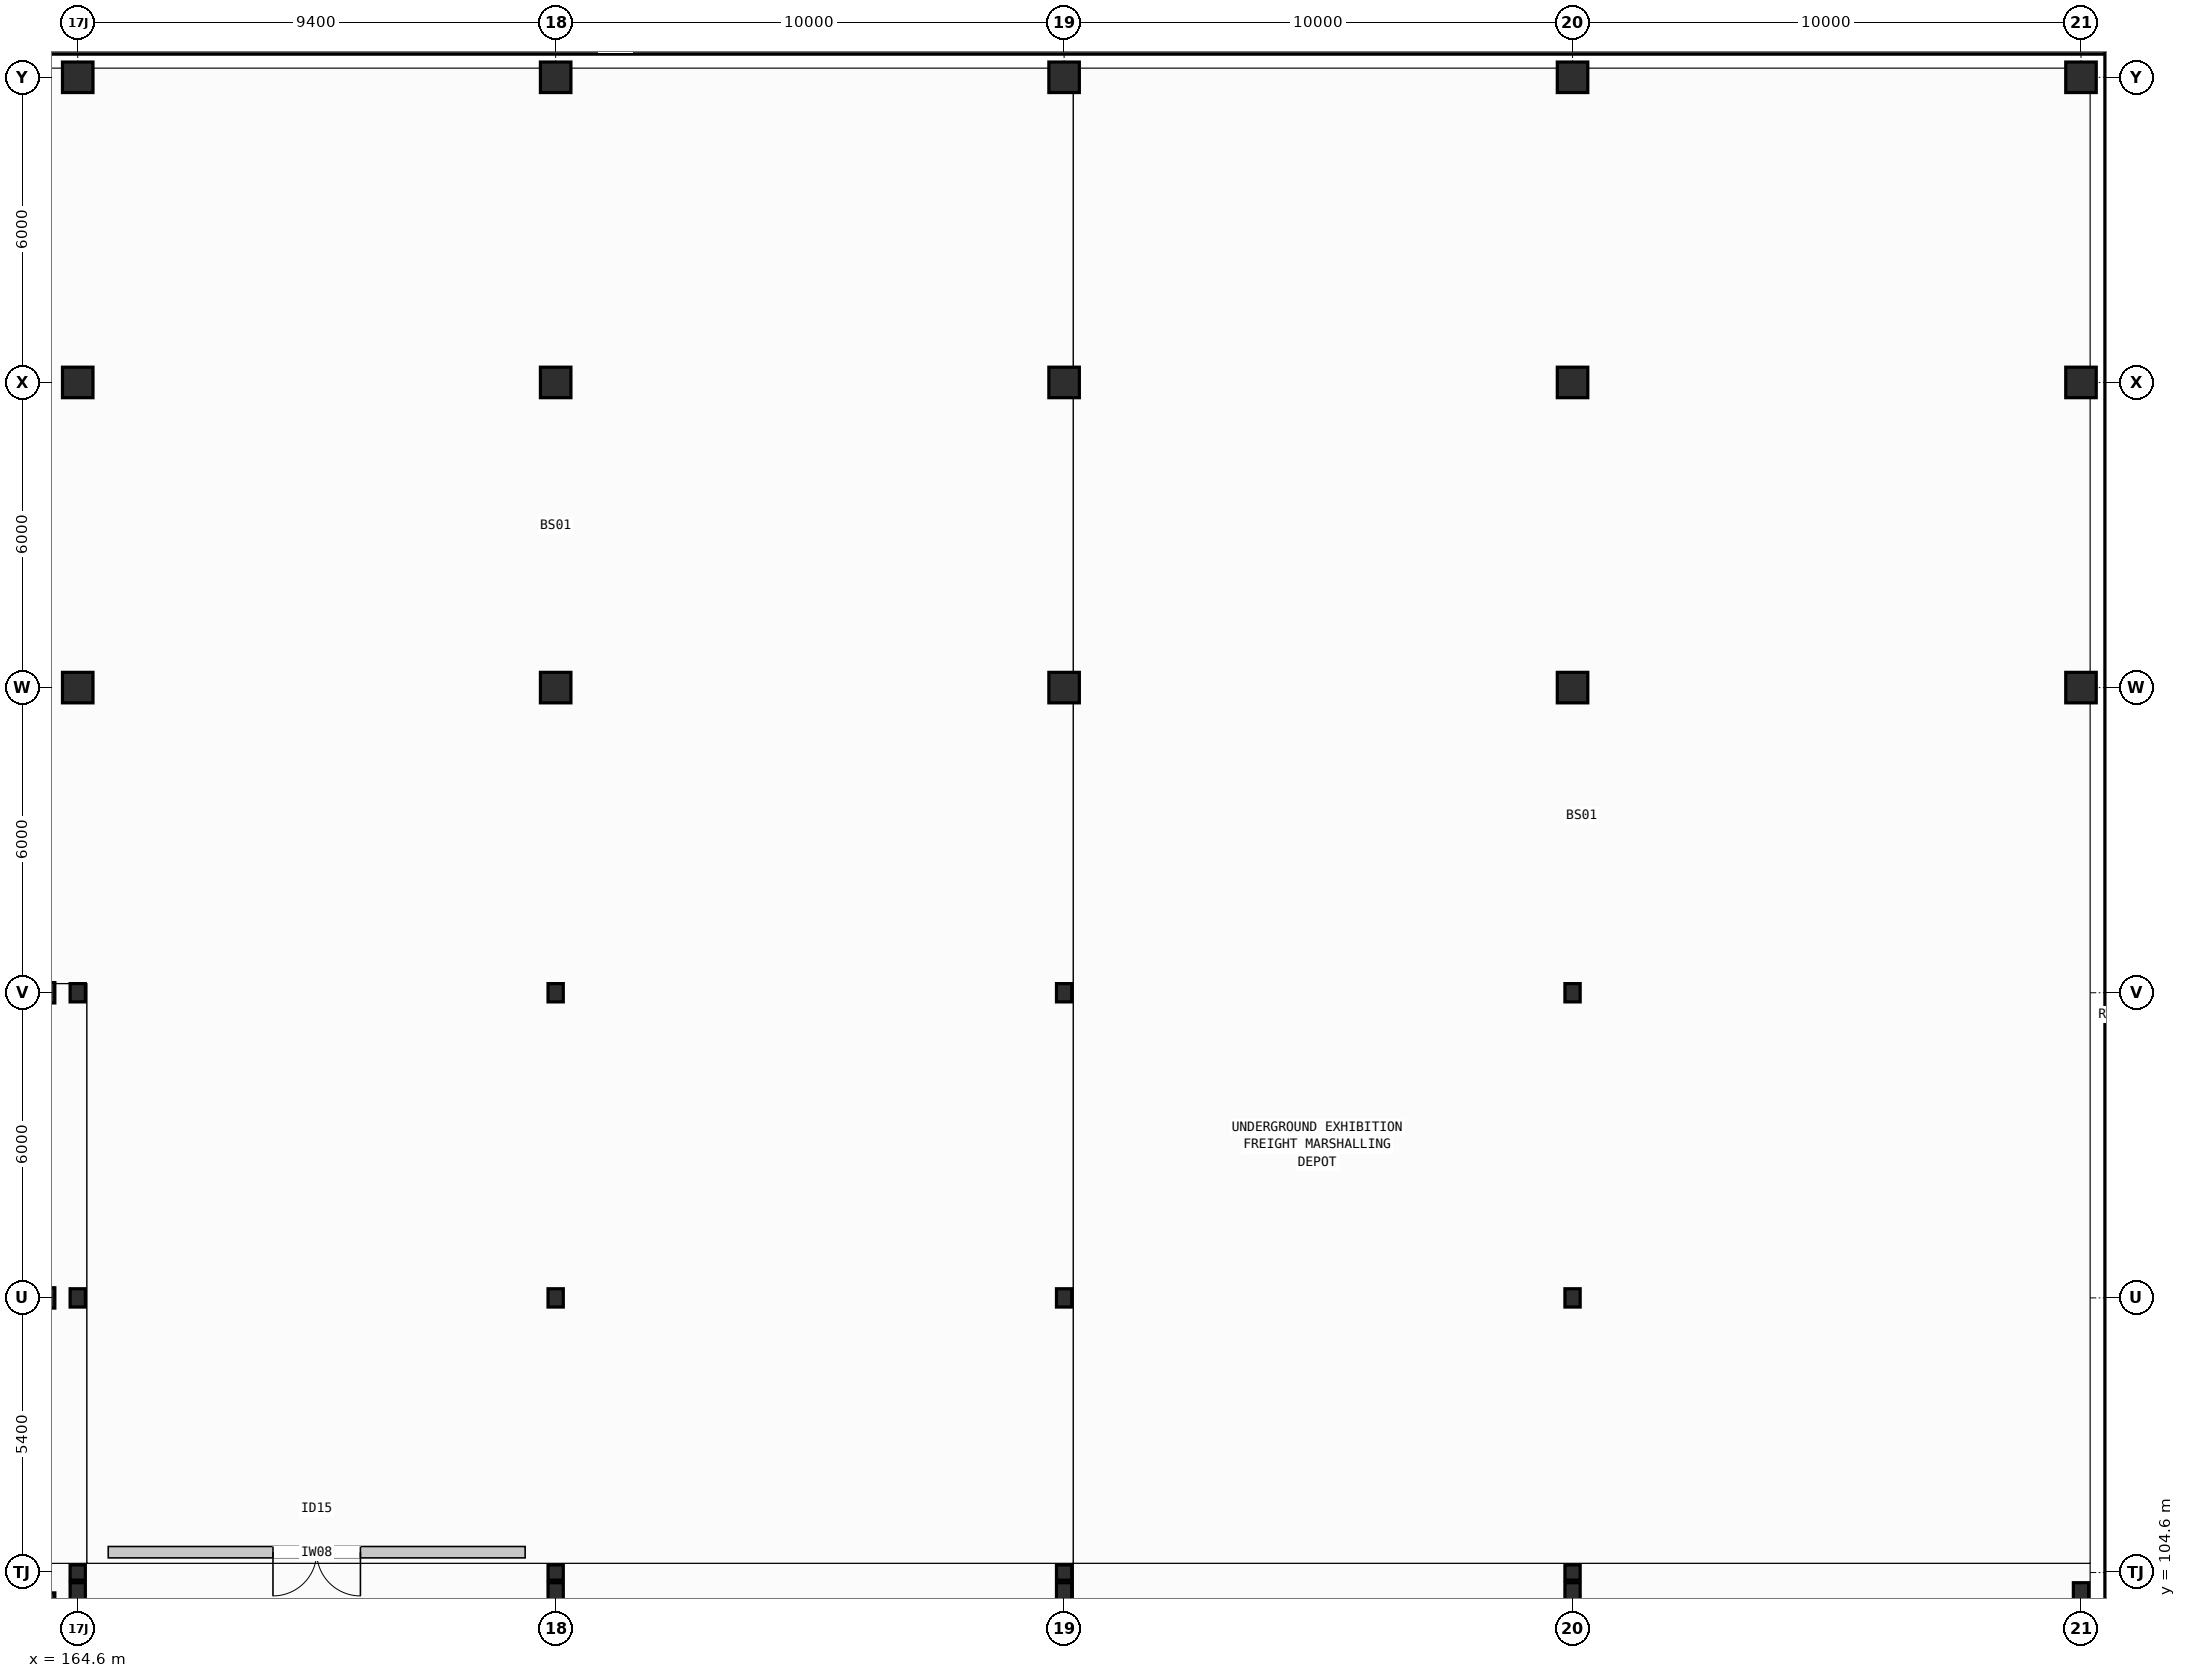
"""IFC4 building model, lengths in metres.
Left out: names, types, materials, properties, quantities, classifications, styles, units other than length and angle.
Written with IfcOpenShell. Run it as: python <this file> out.ifc"""

import sys

from ifc_helpers import new_model, si_unit, direction, frame, frame_2d, origin, origin_2d, place, context, subcontext, project, spatial, rectangle, i_section, extrude, element, fill, save


model = new_model("IFC4")
c1 = context("Model", 3, precision=1e-05, world=origin(), true_north=direction((0.0, 1.0)))
c2 = subcontext(c1, "Body", "Model", "MODEL_VIEW")
j1 = project(units=[si_unit("LENGTHUNIT", "METRE"), si_unit("PLANEANGLEUNIT", "RADIAN")], contexts=[c1])
p1 = place(None, origin())
s1 = spatial("IfcSite", under=j1, at=p1, CompositionType="ELEMENT")
p2 = place(p1, origin())
s2 = spatial("IfcBuilding", under=s1, at=p2, CompositionType="ELEMENT")
p3 = place(p2, frame((0.0, 0.0, -5.4)))
s3 = spatial("IfcBuildingStorey", under=s2, at=p3, CompositionType="ELEMENT", Elevation=-5.4)
for number, where, z_axis, x_axis in (
    (1, (164.0, 104.0, 0.0), (0.0, 0.0, 1.0), (1.0, 0.0, 0.0)),
    (2, (164.0, 110.0, 0.0), (0.0, 0.0, 1.0), (1.0, 0.0, 0.0)),
    (3, (164.0, 116.0, 0.0), (0.0, 0.0, 1.0), (1.0, 0.0, 0.0)),
):
    element("IfcColumn", number, at=place(p3, frame(where, z_axis=z_axis, x_axis=x_axis)), inside=s3, PredefinedType="COLUMN", context=c2, shape_type="SweptSolid", body=[
        extrude(i_section(OverallWidth=0.3, OverallDepth=0.4, WebThickness=0.013, FlangeThickness=0.024, FilletRadius=0.027, at=origin_2d()), origin(), (0.0, 0.0, 1.0), 5.4),
    ])
p4 = place(p3, frame((164.6, 104.0, 0.0), z_axis=(0.0, 0.0, 1.0), x_axis=(1.0, 0.0, 0.0)))
e4 = element("IfcColumn", 4, at=p4, inside=s3, PredefinedType="COLUMN", context=c2, shape_type="SweptSolid", body=[
    extrude(i_section(OverallWidth=0.3, OverallDepth=0.8, WebThickness=0.018, FlangeThickness=0.033, FilletRadius=0.03, at=origin_2d()), origin(), (0.0, 0.0, 1.0), 5.4),
])
p5 = place(p3, frame((164.6, 104.6, 0.0), z_axis=(0.0, 0.0, 1.0), x_axis=(1.0, 0.0, 0.0)))
e5 = element("IfcColumn", 5, at=p5, inside=s3, PredefinedType="COLUMN", context=c2, shape_type="SweptSolid", body=[
    extrude(i_section(OverallWidth=0.3, OverallDepth=0.3, WebThickness=0.011, FlangeThickness=0.019, FilletRadius=0.027, at=origin_2d()), origin(), (0.0, 0.0, 1.0), 5.4),
])
for number, where, z_axis, x_axis in (
    (6, (164.6, 110.0, 0.0), (0.0, 0.0, 1.0), (1.0, 0.0, 0.0)),
    (7, (164.6, 116.0, 0.0), (0.0, 0.0, 1.0), (1.0, 0.0, 0.0)),
):
    element("IfcColumn", number, at=place(p3, frame(where, z_axis=z_axis, x_axis=x_axis)), inside=s3, PredefinedType="COLUMN", context=c2, shape_type="SweptSolid", body=[
        extrude(i_section(OverallWidth=0.3, OverallDepth=0.36, WebThickness=0.012, FlangeThickness=0.022, FilletRadius=0.027, at=origin_2d()), origin(), (0.0, 0.0, 1.0), 5.4),
    ])
for number, where, z_axis, x_axis in (
    (8, (164.6, 122.0, 0.0), (0.0, 0.0, 1.0), (1.0, 0.0, 0.0)),
    (9, (164.6, 128.0, 0.0), (0.0, 0.0, 1.0), (1.0, 0.0, 0.0)),
    (10, (164.6, 134.0, 0.0), (0.0, 0.0, 1.0), (1.0, 0.0, 0.0)),
):
    element("IfcColumn", number, at=place(p3, frame(where, z_axis=z_axis, x_axis=x_axis)), inside=s3, PredefinedType="COLUMN", context=c2, shape_type="SweptSolid", body=[
        extrude(rectangle(XDim=0.6, YDim=0.6, at=origin_2d()), origin(), (0.0, 0.0, 1.0), 5.4),
    ])
p6 = place(p3, frame((174.0, 104.0, 0.0), z_axis=(0.0, 0.0, 1.0), x_axis=(1.0, 0.0, 0.0)))
e11 = element("IfcColumn", 11, at=p6, inside=s3, PredefinedType="COLUMN", context=c2, shape_type="SweptSolid", body=[
    extrude(i_section(OverallWidth=0.3, OverallDepth=0.8, WebThickness=0.018, FlangeThickness=0.033, FilletRadius=0.03, at=origin_2d()), origin(), (0.0, 0.0, 1.0), 5.4),
])
p7 = place(p3, frame((174.0, 104.6, 0.0), z_axis=(0.0, 0.0, 1.0), x_axis=(1.0, 0.0, 0.0)))
e12 = element("IfcColumn", 12, at=p7, inside=s3, PredefinedType="COLUMN", context=c2, shape_type="SweptSolid", body=[
    extrude(i_section(OverallWidth=0.3, OverallDepth=0.3, WebThickness=0.011, FlangeThickness=0.019, FilletRadius=0.027, at=origin_2d()), origin(), (0.0, 0.0, 1.0), 5.4),
])
for number, where, z_axis, x_axis in (
    (13, (174.0, 110.0, 0.0), (0.0, 0.0, 1.0), (1.0, 0.0, 0.0)),
    (14, (174.0, 116.0, 0.0), (0.0, 0.0, 1.0), (1.0, 0.0, 0.0)),
):
    element("IfcColumn", number, at=place(p3, frame(where, z_axis=z_axis, x_axis=x_axis)), inside=s3, PredefinedType="COLUMN", context=c2, shape_type="SweptSolid", body=[
        extrude(i_section(OverallWidth=0.3, OverallDepth=0.36, WebThickness=0.012, FlangeThickness=0.022, FilletRadius=0.027, at=origin_2d()), origin(), (0.0, 0.0, 1.0), 5.4),
    ])
for number, where, z_axis, x_axis in (
    (15, (174.0, 122.0, 0.0), (0.0, 0.0, 1.0), (1.0, 0.0, 0.0)),
    (16, (174.0, 128.0, 0.0), (0.0, 0.0, 1.0), (1.0, 0.0, 0.0)),
    (17, (174.0, 134.0, 0.0), (0.0, 0.0, 1.0), (1.0, 0.0, 0.0)),
):
    element("IfcColumn", number, at=place(p3, frame(where, z_axis=z_axis, x_axis=x_axis)), inside=s3, PredefinedType="COLUMN", context=c2, shape_type="SweptSolid", body=[
        extrude(rectangle(XDim=0.6, YDim=0.6, at=origin_2d()), origin(), (0.0, 0.0, 1.0), 5.4),
    ])
p8 = place(p3, frame((184.0, 104.0, 0.0), z_axis=(0.0, 0.0, 1.0), x_axis=(1.0, 0.0, 0.0)))
e18 = element("IfcColumn", 18, at=p8, inside=s3, PredefinedType="COLUMN", context=c2, shape_type="SweptSolid", body=[
    extrude(i_section(OverallWidth=0.3, OverallDepth=0.8, WebThickness=0.018, FlangeThickness=0.033, FilletRadius=0.03, at=origin_2d()), origin(), (0.0, 0.0, 1.0), 5.4),
])
p9 = place(p3, frame((184.0, 104.6, 0.0), z_axis=(0.0, 0.0, 1.0), x_axis=(1.0, 0.0, 0.0)))
e19 = element("IfcColumn", 19, at=p9, inside=s3, PredefinedType="COLUMN", context=c2, shape_type="SweptSolid", body=[
    extrude(i_section(OverallWidth=0.3, OverallDepth=0.3, WebThickness=0.011, FlangeThickness=0.019, FilletRadius=0.027, at=origin_2d()), origin(), (0.0, 0.0, 1.0), 5.4),
])
for number, where, z_axis, x_axis in (
    (20, (184.0, 110.0, 0.0), (0.0, 0.0, 1.0), (1.0, 0.0, 0.0)),
    (21, (184.0, 116.0, 0.0), (0.0, 0.0, 1.0), (1.0, 0.0, 0.0)),
):
    element("IfcColumn", number, at=place(p3, frame(where, z_axis=z_axis, x_axis=x_axis)), inside=s3, PredefinedType="COLUMN", context=c2, shape_type="SweptSolid", body=[
        extrude(i_section(OverallWidth=0.3, OverallDepth=0.36, WebThickness=0.012, FlangeThickness=0.022, FilletRadius=0.027, at=origin_2d()), origin(), (0.0, 0.0, 1.0), 5.4),
    ])
for number, where, z_axis, x_axis in (
    (22, (184.0, 122.0, 0.0), (0.0, 0.0, 1.0), (1.0, 0.0, 0.0)),
    (23, (184.0, 128.0, 0.0), (0.0, 0.0, 1.0), (1.0, 0.0, 0.0)),
    (24, (184.0, 134.0, 0.0), (0.0, 0.0, 1.0), (1.0, 0.0, 0.0)),
):
    element("IfcColumn", number, at=place(p3, frame(where, z_axis=z_axis, x_axis=x_axis)), inside=s3, PredefinedType="COLUMN", context=c2, shape_type="SweptSolid", body=[
        extrude(rectangle(XDim=0.6, YDim=0.6, at=origin_2d()), origin(), (0.0, 0.0, 1.0), 5.4),
    ])
p10 = place(p3, frame((194.0, 104.0, 0.0), z_axis=(0.0, 0.0, 1.0), x_axis=(1.0, 0.0, 0.0)))
e25 = element("IfcColumn", 25, at=p10, inside=s3, PredefinedType="COLUMN", context=c2, shape_type="SweptSolid", body=[
    extrude(i_section(OverallWidth=0.3, OverallDepth=0.8, WebThickness=0.018, FlangeThickness=0.033, FilletRadius=0.03, at=origin_2d()), origin(), (0.0, 0.0, 1.0), 5.4),
])
p11 = place(p3, frame((194.0, 104.6, 0.0), z_axis=(0.0, 0.0, 1.0), x_axis=(1.0, 0.0, 0.0)))
e26 = element("IfcColumn", 26, at=p11, inside=s3, PredefinedType="COLUMN", context=c2, shape_type="SweptSolid", body=[
    extrude(i_section(OverallWidth=0.3, OverallDepth=0.3, WebThickness=0.011, FlangeThickness=0.019, FilletRadius=0.027, at=origin_2d()), origin(), (0.0, 0.0, 1.0), 5.4),
])
for number, where, z_axis, x_axis in (
    (27, (194.0, 110.0, 0.0), (0.0, 0.0, 1.0), (1.0, 0.0, 0.0)),
    (28, (194.0, 116.0, 0.0), (0.0, 0.0, 1.0), (1.0, 0.0, 0.0)),
):
    element("IfcColumn", number, at=place(p3, frame(where, z_axis=z_axis, x_axis=x_axis)), inside=s3, PredefinedType="COLUMN", context=c2, shape_type="SweptSolid", body=[
        extrude(i_section(OverallWidth=0.3, OverallDepth=0.36, WebThickness=0.012, FlangeThickness=0.022, FilletRadius=0.027, at=origin_2d()), origin(), (0.0, 0.0, 1.0), 5.4),
    ])
for number, where, z_axis, x_axis in (
    (29, (194.0, 122.0, 0.0), (0.0, 0.0, 1.0), (1.0, 0.0, 0.0)),
    (30, (194.0, 128.0, 0.0), (0.0, 0.0, 1.0), (1.0, 0.0, 0.0)),
    (31, (194.0, 134.0, 0.0), (0.0, 0.0, 1.0), (1.0, 0.0, 0.0)),
):
    element("IfcColumn", number, at=place(p3, frame(where, z_axis=z_axis, x_axis=x_axis)), inside=s3, PredefinedType="COLUMN", context=c2, shape_type="SweptSolid", body=[
        extrude(rectangle(XDim=0.6, YDim=0.6, at=origin_2d()), origin(), (0.0, 0.0, 1.0), 5.4),
    ])
p12 = place(p3, frame((204.0, 104.0, 0.0), z_axis=(0.0, 0.0, 1.0), x_axis=(1.0, 0.0, 0.0)))
e32 = element("IfcColumn", 32, at=p12, inside=s3, PredefinedType="COLUMN", context=c2, shape_type="SweptSolid", body=[
    extrude(i_section(OverallWidth=0.3, OverallDepth=0.8, WebThickness=0.018, FlangeThickness=0.033, FilletRadius=0.03, at=origin_2d()), origin(), (0.0, 0.0, 1.0), 5.4),
])
for number, where, z_axis, x_axis in (
    (33, (204.0, 122.0, 0.0), (0.0, 0.0, 1.0), (1.0, 0.0, 0.0)),
    (34, (204.0, 128.0, 0.0), (0.0, 0.0, 1.0), (1.0, 0.0, 0.0)),
    (35, (204.0, 134.0, 0.0), (0.0, 0.0, 1.0), (1.0, 0.0, 0.0)),
):
    element("IfcColumn", number, at=place(p3, frame(where, z_axis=z_axis, x_axis=x_axis)), inside=s3, PredefinedType="COLUMN", context=c2, shape_type="SweptSolid", body=[
        extrude(rectangle(XDim=0.6, YDim=0.6, at=origin_2d()), origin(), (0.0, 0.0, 1.0), 5.4),
    ])
p13 = place(p3, frame((145.525, 134.65, 0.0), z_axis=(0.0, 0.0, 1.0), x_axis=(1.0, 0.0, 0.0)))
e36 = element("IfcWall", 36, at=p13, inside=s3, PredefinedType="SOLIDWALL", context=c2, shape_type="SweptSolid", body=[
    extrude(rectangle(XDim=59.32, YDim=0.39, at=frame_2d((29.66, 0.0))), origin(), (0.0, 0.0, 1.0), 5.048),
])
p14 = place(p3, frame((204.65, 134.478, 0.0), z_axis=(0.0, 0.0, 1.0), x_axis=(0.0, -1.0, 0.0)))
e37 = element("IfcWall", 37, at=p14, inside=s3, PredefinedType="SOLIDWALL", context=c2, shape_type="SweptSolid", body=[
    extrude(rectangle(XDim=118.956, YDim=0.36, at=frame_2d((59.478, 0.0))), origin(), (0.0, 0.0, 1.0), 5.048),
])
p15 = place(p3, frame((165.2, 105.0, 0.0), z_axis=(0.0, 0.0, 1.0), x_axis=(1.0, 0.0, 0.0)))
e38 = element("IfcWall", 38, at=p15, inside=s3, PredefinedType="PARTITIONING", context=c2, shape_type="SweptSolid", body=[
    extrude(rectangle(XDim=8.2, YDim=0.224, at=frame_2d((4.1, 0.0))), origin(), (0.0, 0.0, 1.0), 4.4),
])
p16 = place(p15, frame((3.24, 0.0, 0.0)))
e39 = element("IfcOpeningElement", 39, at=p16, cuts=e38, PredefinedType="OPENING", context=c2, shape_type="SweptSolid", body=[
    extrude(rectangle(XDim=1.72, YDim=2.28, at=frame_2d((0.86, 1.14))), frame((0.0, 0.122, 0.0), z_axis=(0.0, -1.0, 0.0), x_axis=(1.0, 0.0, 0.0)), (0.0, 0.0, 1.0), 0.244),
])
p17 = place(p16, frame((1.72, 0.0, 0.0), z_axis=(0.0, 0.0, 1.0), x_axis=(-1.0, 0.0, 0.0)))
e40 = element("IfcDoor", 40, at=p17, inside=s3, OperationType="DOUBLE_DOOR_SINGLE_SWING", PredefinedType="DOOR", context=c2, shape_type="SweptSolid", body=[
    extrude(rectangle(XDim=1.72, YDim=2.28, at=frame_2d((0.86, 1.14))), frame((0.0, 0.025, 0.0), z_axis=(0.0, -1.0, 0.0), x_axis=(1.0, 0.0, 0.0)), (0.0, 0.0, 1.0), 0.05),
])
fill(e39, e40)
save(model, sys.argv[1])
